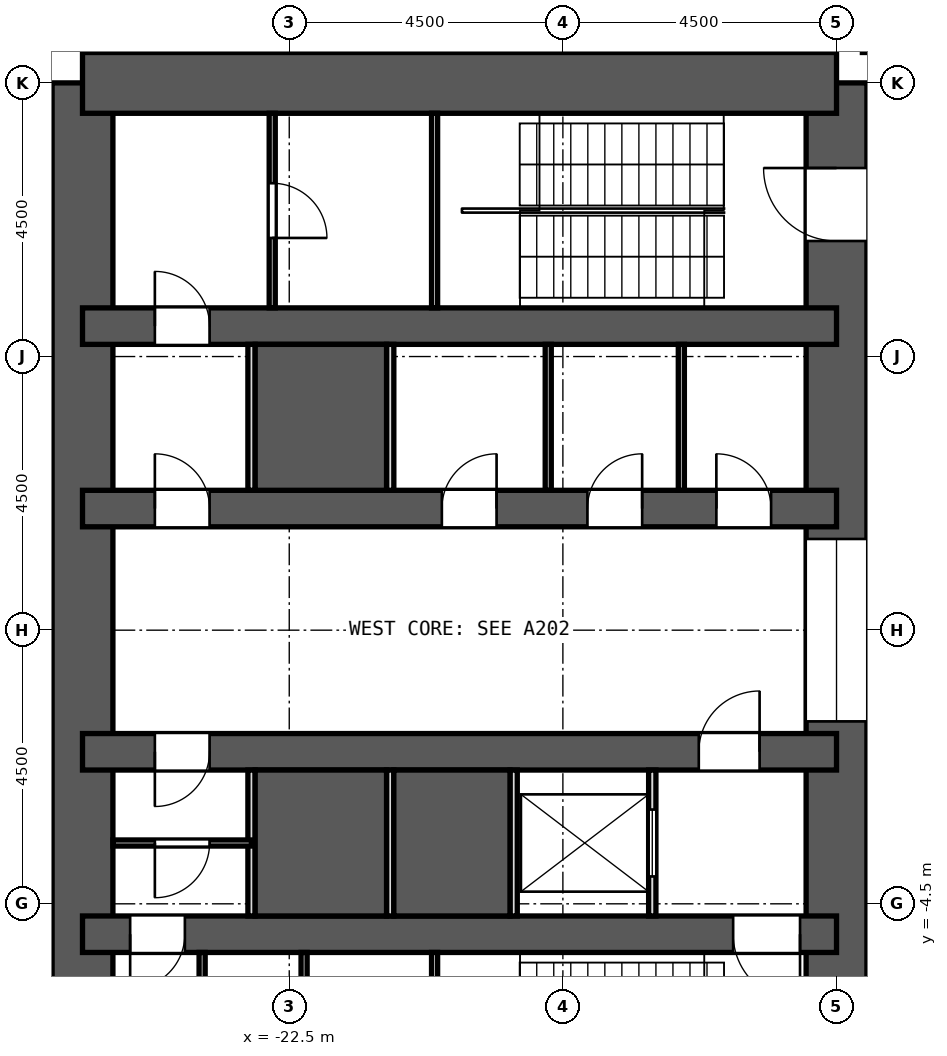
"""IFC4 building model, lengths in metres.
Left out: names, types, materials, properties, quantities, classifications, styles, units other than length and angle.
Written with IfcOpenShell. Run it as: python <this file> out.ifc"""

import sys

from ifc_helpers import new_model, si_unit, direction, frame, frame_2d, origin, place, context, subcontext, project, spatial, rectangle, extrude, element, fill, save


model = new_model("IFC4")
c1 = context("Model", 3, precision=1e-05, world=origin(), true_north=direction((0.0, 1.0)))
c2 = subcontext(c1, "Body", "Model", "MODEL_VIEW")
j1 = project(units=[si_unit("LENGTHUNIT", "METRE"), si_unit("PLANEANGLEUNIT", "RADIAN")], contexts=[c1])
p1 = place(None, origin())
s1 = spatial("IfcSite", under=j1, at=p1, CompositionType="ELEMENT")
p2 = place(p1, origin())
s2 = spatial("IfcBuilding", under=s1, at=p2, CompositionType="ELEMENT")
p3 = place(p2, frame((0.0, 0.0, -4.5)))
s3 = spatial("IfcBuildingStorey", under=s2, at=p3, CompositionType="ELEMENT", Elevation=-4.5)
p4 = place(p3, frame((-13.5, -9.0, 0.0), z_axis=(0.0, 0.0, 1.0), x_axis=(0.0, 1.0, 0.0)))
e1 = element("IfcWall", 1, at=p4, inside=s3, PredefinedType="SHEAR", context=c2, shape_type="SweptSolid", body=[
    extrude(rectangle(XDim=18.0, YDim=1.0, at=frame_2d((9.0, 0.0))), origin(), (0.0, 0.0, 1.0), 4.5),
])
p5 = place(p4, frame((15.4, 0.0, 0.0)))
e2 = element("IfcOpeningElement", 2, at=p5, cuts=e1, PredefinedType="OPENING", context=c2, shape_type="SweptSolid", body=[
    extrude(rectangle(XDim=1.2, YDim=2.1, at=frame_2d((0.6, 1.05))), frame((0.0, 0.512, 0.0), z_axis=(0.0, -1.0, 0.0), x_axis=(1.0, 0.0, 0.0)), (0.0, 0.0, 1.0), 1.024),
])
p6 = place(p4, frame((1.4, 0.0, 0.0)))
e3 = element("IfcOpeningElement", 3, at=p6, cuts=e1, PredefinedType="OPENING", context=c2, shape_type="SweptSolid", body=[
    extrude(rectangle(XDim=1.2, YDim=2.1, at=frame_2d((0.6, 1.05))), frame((0.0, 0.512, 0.0), z_axis=(0.0, -1.0, 0.0), x_axis=(1.0, 0.0, 0.0)), (0.0, 0.0, 1.0), 1.024),
])
p7 = place(p4, frame((7.5, 0.0, 0.0)))
e4 = element("IfcOpeningElement", 4, at=p7, cuts=e1, PredefinedType="OPENING", context=c2, shape_type="SweptSolid", body=[
    extrude(rectangle(XDim=3.0, YDim=2.4, at=frame_2d((1.5, 1.2))), frame((0.0, 0.512, 0.0), z_axis=(0.0, -1.0, 0.0), x_axis=(1.0, 0.0, 0.0)), (0.0, 0.0, 1.0), 1.024),
])
p8 = place(p3, frame((-25.9, -9.0, 0.0), z_axis=(0.0, 0.0, 1.0), x_axis=(0.0, 1.0, 0.0)))
e5 = element("IfcWall", 5, at=p8, inside=s3, PredefinedType="SHEAR", context=c2, shape_type="SweptSolid", body=[
    extrude(rectangle(XDim=18.0, YDim=1.0, at=frame_2d((9.0, 0.0))), origin(), (0.0, 0.0, 1.0), 4.5),
])
p9 = place(p3, frame((-13.5, 9.0, 0.0), z_axis=(0.0, 0.0, 1.0), x_axis=(-1.0, 0.0, 0.0)))
e6 = element("IfcWall", 6, at=p9, inside=s3, PredefinedType="SHEAR", context=c2, shape_type="SweptSolid", body=[
    extrude(rectangle(XDim=12.4, YDim=1.0, at=frame_2d((6.2, 0.0))), origin(), (0.0, 0.0, 1.0), 4.5),
])
p10 = place(p3, frame((-13.5, 5.0, 0.0), z_axis=(0.0, 0.0, 1.0), x_axis=(-1.0, 0.0, 0.0)))
e7 = element("IfcWall", 7, at=p10, inside=s3, PredefinedType="SHEAR", context=c2, shape_type="SweptSolid", body=[
    extrude(rectangle(XDim=12.4, YDim=0.6, at=frame_2d((6.2, 0.0))), origin(), (0.0, 0.0, 1.0), 4.5),
])
p11 = place(p10, frame((10.31, 0.0, 0.0)))
e8 = element("IfcOpeningElement", 8, at=p11, cuts=e7, PredefinedType="OPENING", context=c2, shape_type="SweptSolid", body=[
    extrude(rectangle(XDim=0.9, YDim=2.1, at=frame_2d((0.45, 1.05))), frame((0.0, 0.312, 0.0), z_axis=(0.0, -1.0, 0.0), x_axis=(1.0, 0.0, 0.0)), (0.0, 0.0, 1.0), 0.624),
])
p12 = place(p3, frame((-13.5, -5.0, 0.0), z_axis=(0.0, 0.0, 1.0), x_axis=(-1.0, 0.0, 0.0)))
e9 = element("IfcWall", 9, at=p12, inside=s3, PredefinedType="SHEAR", context=c2, shape_type="SweptSolid", body=[
    extrude(rectangle(XDim=12.4, YDim=0.6, at=frame_2d((6.2, 0.0))), origin(), (0.0, 0.0, 1.0), 4.5),
])
p13 = place(p12, frame((10.716, 0.0, 0.0)))
e10 = element("IfcOpeningElement", 10, at=p13, cuts=e9, PredefinedType="OPENING", context=c2, shape_type="SweptSolid", body=[
    extrude(rectangle(XDim=0.9, YDim=2.1, at=frame_2d((0.45, 1.05))), frame((0.0, 0.312, 0.0), z_axis=(0.0, -1.0, 0.0), x_axis=(1.0, 0.0, 0.0)), (0.0, 0.0, 1.0), 0.624),
])
p14 = place(p12, frame((0.6, 0.0, 0.0)))
e11 = element("IfcOpeningElement", 11, at=p14, cuts=e9, PredefinedType="OPENING", context=c2, shape_type="SweptSolid", body=[
    extrude(rectangle(XDim=1.1, YDim=2.1, at=frame_2d((0.55, 1.05))), frame((0.0, 0.312, 0.0), z_axis=(0.0, -1.0, 0.0), x_axis=(1.0, 0.0, 0.0)), (0.0, 0.0, 1.0), 0.624),
])
p15 = place(p3, frame((-13.5, 2.0, 0.0), z_axis=(0.0, 0.0, 1.0), x_axis=(-1.0, 0.0, 0.0)))
e12 = element("IfcWall", 12, at=p15, inside=s3, PredefinedType="SHEAR", context=c2, shape_type="SweptSolid", body=[
    extrude(rectangle(XDim=12.4, YDim=0.6, at=frame_2d((6.2, 0.0))), origin(), (0.0, 0.0, 1.0), 4.5),
])
p16 = place(p15, frame((1.076, 0.0, 0.0)))
e13 = element("IfcOpeningElement", 13, at=p16, cuts=e12, PredefinedType="OPENING", context=c2, shape_type="SweptSolid", body=[
    extrude(rectangle(XDim=0.9, YDim=2.1, at=frame_2d((0.45, 1.05))), frame((0.0, 0.312, 0.0), z_axis=(0.0, -1.0, 0.0), x_axis=(1.0, 0.0, 0.0)), (0.0, 0.0, 1.0), 0.624),
])
p17 = place(p15, frame((3.196, 0.0, 0.0)))
e14 = element("IfcOpeningElement", 14, at=p17, cuts=e12, PredefinedType="OPENING", context=c2, shape_type="SweptSolid", body=[
    extrude(rectangle(XDim=0.9, YDim=2.1, at=frame_2d((0.45, 1.05))), frame((0.0, 0.312, 0.0), z_axis=(0.0, -1.0, 0.0), x_axis=(1.0, 0.0, 0.0)), (0.0, 0.0, 1.0), 0.624),
])
p18 = place(p15, frame((5.59, 0.0, 0.0)))
e15 = element("IfcOpeningElement", 15, at=p18, cuts=e12, PredefinedType="OPENING", context=c2, shape_type="SweptSolid", body=[
    extrude(rectangle(XDim=0.9, YDim=2.1, at=frame_2d((0.45, 1.05))), frame((0.0, 0.312, 0.0), z_axis=(0.0, -1.0, 0.0), x_axis=(1.0, 0.0, 0.0)), (0.0, 0.0, 1.0), 0.624),
])
p19 = place(p15, frame((10.31, 0.0, 0.0)))
e16 = element("IfcOpeningElement", 16, at=p19, cuts=e12, PredefinedType="OPENING", context=c2, shape_type="SweptSolid", body=[
    extrude(rectangle(XDim=0.9, YDim=2.1, at=frame_2d((0.45, 1.05))), frame((0.0, 0.312, 0.0), z_axis=(0.0, -1.0, 0.0), x_axis=(1.0, 0.0, 0.0)), (0.0, 0.0, 1.0), 0.624),
])
p20 = place(p3, frame((-13.5, -2.0, 0.0), z_axis=(0.0, 0.0, 1.0), x_axis=(-1.0, 0.0, 0.0)))
e17 = element("IfcWall", 17, at=p20, inside=s3, PredefinedType="SHEAR", context=c2, shape_type="SweptSolid", body=[
    extrude(rectangle(XDim=12.4, YDim=0.6, at=frame_2d((6.2, 0.0))), origin(), (0.0, 0.0, 1.0), 4.5),
])
p21 = place(p20, frame((1.265, 0.0, 0.0)))
e18 = element("IfcOpeningElement", 18, at=p21, cuts=e17, PredefinedType="OPENING", context=c2, shape_type="SweptSolid", body=[
    extrude(rectangle(XDim=1.0, YDim=2.1, at=frame_2d((0.5, 1.05))), frame((0.0, 0.312, 0.0), z_axis=(0.0, -1.0, 0.0), x_axis=(1.0, 0.0, 0.0)), (0.0, 0.0, 1.0), 0.624),
])
p22 = place(p20, frame((10.31, 0.0, 0.0)))
e19 = element("IfcOpeningElement", 19, at=p22, cuts=e17, PredefinedType="OPENING", context=c2, shape_type="SweptSolid", body=[
    extrude(rectangle(XDim=0.9, YDim=2.1, at=frame_2d((0.45, 1.05))), frame((0.0, 0.312, 0.0), z_axis=(0.0, -1.0, 0.0), x_axis=(1.0, 0.0, 0.0)), (0.0, 0.0, 1.0), 0.624),
])
p23 = place(p3, frame((-12.965, 12.965, 0.0), z_axis=(0.0, 0.0, 1.0), x_axis=(0.707106781187, -0.707106781187, 0.0)))
e20 = element("IfcWall", 20, at=p23, inside=s3, PredefinedType="PARTITIONING", context=c2, shape_type="SweptSolid", body=[
    extrude(rectangle(XDim=5.498, YDim=0.15, at=frame_2d((2.749, 0.0))), origin(), (0.0, 0.0, 1.0), 3.95),
])
p24 = place(p23, frame((2.272, 0.0, 0.0)))
e21 = element("IfcOpeningElement", 21, at=p24, cuts=e20, PredefinedType="OPENING", context=c2, shape_type="SweptSolid", body=[
    extrude(rectangle(XDim=0.9, YDim=2.1, at=frame_2d((0.45, 1.05))), frame((0.0, 0.087, 0.0), z_axis=(0.0, -1.0, 0.0), x_axis=(1.0, 0.0, 0.0)), (0.0, 0.0, 1.0), 0.174),
])
p25 = place(p3, frame((-13.0, 9.5, 0.0), z_axis=(0.0, 0.0, 1.0), x_axis=(0.0, 1.0, 0.0)))
e22 = element("IfcWall", 22, at=p25, inside=s3, PredefinedType="PARTITIONING", context=c2, shape_type="SweptSolid", body=[
    extrude(rectangle(XDim=3.425, YDim=0.15, at=frame_2d((1.712, 0.0))), origin(), (0.0, 0.0, 1.0), 3.95),
])
p26 = place(p25, frame((1.15, 0.0, 0.0)))
e23 = element("IfcOpeningElement", 23, at=p26, cuts=e22, PredefinedType="OPENING", context=c2, shape_type="SweptSolid", body=[
    extrude(rectangle(XDim=1.2, YDim=2.1, at=frame_2d((0.6, 1.05))), frame((0.0, 0.087, 0.0), z_axis=(0.0, -1.0, 0.0), x_axis=(1.0, 0.0, 0.0)), (0.0, 0.0, 1.0), 0.174),
])
for number, where, z_axis, x_axis in (
    (24, (-16.052, 2.3, 0.0), (0.0, 0.0, 1.0), (0.0, 1.0, 0.0)),
    (25, (-18.241, 2.3, 0.0), (0.0, 0.0, 1.0), (0.0, 1.0, 0.0)),
):
    element("IfcWall", number, at=place(p3, frame(where, z_axis=z_axis, x_axis=x_axis)), inside=s3, PredefinedType="PARTITIONING", context=c2, shape_type="SweptSolid", body=[
        extrude(rectangle(XDim=2.4, YDim=0.1, at=frame_2d((1.2, 0.0))), origin(), (0.0, 0.0, 1.0), 3.95),
    ])
for number, where, z_axis, x_axis in (
    (26, (-20.84, 2.3, 0.0), (0.0, 0.0, 1.0), (0.0, 1.0, 0.0)),
    (27, (-23.12, 2.3, 0.0), (0.0, 0.0, 1.0), (0.0, 1.0, 0.0)),
):
    element("IfcWall", number, at=place(p3, frame(where, z_axis=z_axis, x_axis=x_axis)), inside=s3, PredefinedType="PARTITIONING", context=c2, shape_type="SweptSolid", body=[
        extrude(rectangle(XDim=2.4, YDim=0.12, at=frame_2d((1.2, 0.0))), origin(), (0.0, 0.0, 1.0), 3.95),
    ])
p27 = place(p3, frame((-16.53, -4.7, 0.0), z_axis=(0.0, 0.0, 1.0), x_axis=(0.0, 1.0, 0.0)))
e28 = element("IfcWall", 28, at=p27, inside=s3, PredefinedType="PARTITIONING", context=c2, shape_type="SweptSolid", body=[
    extrude(rectangle(XDim=2.4, YDim=0.12, at=frame_2d((1.2, 0.0))), origin(), (0.0, 0.0, 1.0), 3.95),
])
p28 = place(p27, frame((0.65, 0.0, 0.0)))
e29 = element("IfcOpeningElement", 29, at=p28, cuts=e28, PredefinedType="OPENING", context=c2, shape_type="SweptSolid", body=[
    extrude(rectangle(XDim=1.1, YDim=2.1, at=frame_2d((0.55, 1.05))), frame((0.0, 0.072, 0.0), z_axis=(0.0, -1.0, 0.0), x_axis=(1.0, 0.0, 0.0)), (0.0, 0.0, 1.0), 0.144),
])
for number, where, z_axis, x_axis in (
    (30, (-18.81, -4.7, 0.0), (0.0, 0.0, 1.0), (0.0, 1.0, 0.0)),
    (31, (-20.84, -4.7, 0.0), (0.0, 0.0, 1.0), (0.0, 1.0, 0.0)),
    (32, (-23.12, -4.7, 0.0), (0.0, 0.0, 1.0), (0.0, 1.0, 0.0)),
):
    element("IfcWall", number, at=place(p3, frame(where, z_axis=z_axis, x_axis=x_axis)), inside=s3, PredefinedType="PARTITIONING", context=c2, shape_type="SweptSolid", body=[
        extrude(rectangle(XDim=2.4, YDim=0.12, at=frame_2d((1.2, 0.0))), origin(), (0.0, 0.0, 1.0), 3.95),
    ])
p29 = place(p3, frame((-23.12, -3.5, 0.0), z_axis=(0.0, 0.0, 1.0), x_axis=(-1.0, 0.0, 0.0)))
e33 = element("IfcWall", 33, at=p29, inside=s3, PredefinedType="PARTITIONING", context=c2, shape_type="SweptSolid", body=[
    extrude(rectangle(XDim=2.28, YDim=0.1, at=frame_2d((1.14, 0.0))), origin(), (0.0, 0.0, 1.0), 3.95),
])
p30 = place(p29, frame((0.69, 0.0, 0.0)))
e34 = element("IfcOpeningElement", 34, at=p30, cuts=e33, PredefinedType="OPENING", context=c2, shape_type="SweptSolid", body=[
    extrude(rectangle(XDim=0.9, YDim=2.1, at=frame_2d((0.45, 1.05))), frame((0.0, 0.062, 0.0), z_axis=(0.0, -1.0, 0.0), x_axis=(1.0, 0.0, 0.0)), (0.0, 0.0, 1.0), 0.124),
])
p31 = place(p3, frame((-20.11, 5.3, 0.0), z_axis=(0.0, 0.0, 1.0), x_axis=(0.0, 1.0, 0.0)))
e35 = element("IfcWall", 35, at=p31, inside=s3, PredefinedType="PARTITIONING", context=c2, shape_type="SweptSolid", body=[
    extrude(rectangle(XDim=3.2, YDim=0.1, at=frame_2d((1.6, 0.0))), origin(), (0.0, 0.0, 1.0), 3.95),
])
p32 = place(p3, frame((-22.78, 5.3, 0.0), z_axis=(0.0, 0.0, 1.0), x_axis=(0.0, 1.0, 0.0)))
e36 = element("IfcWall", 36, at=p32, inside=s3, PredefinedType="PARTITIONING", context=c2, shape_type="SweptSolid", body=[
    extrude(rectangle(XDim=3.2, YDim=0.1, at=frame_2d((1.6, 0.0))), origin(), (0.0, 0.0, 1.0), 3.95),
])
p33 = place(p32, frame((1.15, 0.0, 0.0)))
e37 = element("IfcOpeningElement", 37, at=p33, cuts=e36, PredefinedType="OPENING", context=c2, shape_type="SweptSolid", body=[
    extrude(rectangle(XDim=0.9, YDim=2.1, at=frame_2d((0.45, 1.05))), frame((0.0, 0.062, 0.0), z_axis=(0.0, -1.0, 0.0), x_axis=(1.0, 0.0, 0.0)), (0.0, 0.0, 1.0), 0.124),
])
p34 = place(p3, frame((-20.11, -8.5, 0.0), z_axis=(0.0, 0.0, 1.0), x_axis=(0.0, 1.0, 0.0)))
e38 = element("IfcWall", 38, at=p34, inside=s3, PredefinedType="PARTITIONING", context=c2, shape_type="SweptSolid", body=[
    extrude(rectangle(XDim=3.2, YDim=0.1, at=frame_2d((1.6, 0.0))), origin(), (0.0, 0.0, 1.0), 3.95),
])
p35 = place(p3, frame((-22.256, -8.5, 0.0), z_axis=(0.0, 0.0, 1.0), x_axis=(0.0, 1.0, 0.0)))
e39 = element("IfcWall", 39, at=p35, inside=s3, PredefinedType="PARTITIONING", context=c2, shape_type="SweptSolid", body=[
    extrude(rectangle(XDim=3.2, YDim=0.1, at=frame_2d((1.6, 0.0))), origin(), (0.0, 0.0, 1.0), 3.95),
])
p36 = place(p35, frame((1.15, 0.0, 0.0)))
e40 = element("IfcOpeningElement", 40, at=p36, cuts=e39, PredefinedType="OPENING", context=c2, shape_type="SweptSolid", body=[
    extrude(rectangle(XDim=0.9, YDim=2.1, at=frame_2d((0.45, 1.05))), frame((0.0, 0.062, 0.0), z_axis=(0.0, -1.0, 0.0), x_axis=(1.0, 0.0, 0.0)), (0.0, 0.0, 1.0), 0.124),
])
p37 = place(p3, frame((-23.933, -8.5, 0.0), z_axis=(0.0, 0.0, 1.0), x_axis=(0.0, 1.0, 0.0)))
e41 = element("IfcWall", 41, at=p37, inside=s3, PredefinedType="PARTITIONING", context=c2, shape_type="SweptSolid", body=[
    extrude(rectangle(XDim=3.2, YDim=0.1, at=frame_2d((1.6, 0.0))), origin(), (0.0, 0.0, 1.0), 3.95),
])
p38 = place(p37, frame((1.15, 0.0, 0.0)))
e42 = element("IfcOpeningElement", 42, at=p38, cuts=e41, PredefinedType="OPENING", context=c2, shape_type="SweptSolid", body=[
    extrude(rectangle(XDim=0.9, YDim=2.1, at=frame_2d((0.45, 1.05))), frame((0.0, 0.062, 0.0), z_axis=(0.0, -1.0, 0.0), x_axis=(1.0, 0.0, 0.0)), (0.0, 0.0, 1.0), 0.124),
])
p39 = place(p3, frame((-20.9, 3.5, 0.0), z_axis=(0.0, 0.0, 1.0), x_axis=(-1.0, 0.0, 0.0)))
e43 = element("IfcWall", 43, at=p39, inside=s3, PredefinedType="SOLIDWALL", context=c2, shape_type="SweptSolid", body=[
    extrude(rectangle(XDim=2.16, YDim=2.4, at=frame_2d((1.08, 0.0))), origin(), (0.0, 0.0, 1.0), 3.1),
])
p40 = place(p3, frame((-18.87, -3.5, 0.0), z_axis=(0.0, 0.0, 1.0), x_axis=(-1.0, 0.0, 0.0)))
e44 = element("IfcWall", 44, at=p40, inside=s3, PredefinedType="SOLIDWALL", context=c2, shape_type="SweptSolid", body=[
    extrude(rectangle(XDim=1.91, YDim=2.4, at=frame_2d((0.955, 0.0))), origin(), (0.0, 0.0, 1.0), 3.1),
])
p41 = place(p3, frame((-20.9, -3.5, 0.0), z_axis=(0.0, 0.0, 1.0), x_axis=(-1.0, 0.0, 0.0)))
e45 = element("IfcWall", 45, at=p41, inside=s3, PredefinedType="SOLIDWALL", context=c2, shape_type="SweptSolid", body=[
    extrude(rectangle(XDim=2.16, YDim=2.4, at=frame_2d((1.08, 0.0))), origin(), (0.0, 0.0, 1.0), 3.1),
])
p42 = place(p28, origin())
e46 = element("IfcDoor", 46, at=p42, inside=s3, OperationType="DOUBLE_DOOR_SLIDING", PredefinedType="DOOR", context=c2, shape_type="SweptSolid", body=[
    extrude(rectangle(XDim=1.1, YDim=2.1, at=frame_2d((0.55, 1.05))), frame((0.0, 0.025, 0.0), z_axis=(0.0, -1.0, 0.0), x_axis=(1.0, 0.0, 0.0)), (0.0, 0.0, 1.0), 0.05),
])
fill(e29, e46)
p43 = place(p16, frame((0.9, 0.0, 0.0), z_axis=(0.0, 0.0, 1.0), x_axis=(-1.0, 0.0, 0.0)))
e47 = element("IfcDoor", 47, at=p43, inside=s3, OperationType="SINGLE_SWING_LEFT", PredefinedType="DOOR", context=c2, shape_type="SweptSolid", body=[
    extrude(rectangle(XDim=0.9, YDim=2.1, at=frame_2d((0.45, 1.05))), frame((0.0, 0.025, 0.0), z_axis=(0.0, -1.0, 0.0), x_axis=(1.0, 0.0, 0.0)), (0.0, 0.0, 1.0), 0.05),
])
fill(e13, e47)
p44 = place(p17, frame((0.9, 0.0, 0.0), z_axis=(0.0, 0.0, 1.0), x_axis=(-1.0, 0.0, 0.0)))
e48 = element("IfcDoor", 48, at=p44, inside=s3, OperationType="SINGLE_SWING_RIGHT", PredefinedType="DOOR", context=c2, shape_type="SweptSolid", body=[
    extrude(rectangle(XDim=0.9, YDim=2.1, at=frame_2d((0.45, 1.05))), frame((0.0, 0.025, 0.0), z_axis=(0.0, -1.0, 0.0), x_axis=(1.0, 0.0, 0.0)), (0.0, 0.0, 1.0), 0.05),
])
fill(e14, e48)
p45 = place(p18, frame((0.9, 0.0, 0.0), z_axis=(0.0, 0.0, 1.0), x_axis=(-1.0, 0.0, 0.0)))
e49 = element("IfcDoor", 49, at=p45, inside=s3, OperationType="SINGLE_SWING_RIGHT", PredefinedType="DOOR", context=c2, shape_type="SweptSolid", body=[
    extrude(rectangle(XDim=0.9, YDim=2.1, at=frame_2d((0.45, 1.05))), frame((0.0, 0.025, 0.0), z_axis=(0.0, -1.0, 0.0), x_axis=(1.0, 0.0, 0.0)), (0.0, 0.0, 1.0), 0.05),
])
fill(e15, e49)
p46 = place(p19, frame((0.9, 0.0, 0.0), z_axis=(0.0, 0.0, 1.0), x_axis=(-1.0, 0.0, 0.0)))
e50 = element("IfcDoor", 50, at=p46, inside=s3, OperationType="SINGLE_SWING_LEFT", PredefinedType="DOOR", context=c2, shape_type="SweptSolid", body=[
    extrude(rectangle(XDim=0.9, YDim=2.1, at=frame_2d((0.45, 1.05))), frame((0.0, 0.025, 0.0), z_axis=(0.0, -1.0, 0.0), x_axis=(1.0, 0.0, 0.0)), (0.0, 0.0, 1.0), 0.05),
])
fill(e16, e50)
p47 = place(p21, frame((1.0, 0.0, 0.0), z_axis=(0.0, 0.0, 1.0), x_axis=(-1.0, 0.0, 0.0)))
e51 = element("IfcDoor", 51, at=p47, inside=s3, OperationType="SINGLE_SWING_RIGHT", PredefinedType="DOOR", context=c2, shape_type="SweptSolid", body=[
    extrude(rectangle(XDim=1.0, YDim=2.1, at=frame_2d((0.5, 1.05))), frame((0.0, 0.025, 0.0), z_axis=(0.0, -1.0, 0.0), x_axis=(1.0, 0.0, 0.0)), (0.0, 0.0, 1.0), 0.05),
])
fill(e18, e51)
p48 = place(p22, origin())
e52 = element("IfcDoor", 52, at=p48, inside=s3, OperationType="SINGLE_SWING_RIGHT", PredefinedType="DOOR", context=c2, shape_type="SweptSolid", body=[
    extrude(rectangle(XDim=0.9, YDim=2.1, at=frame_2d((0.45, 1.05))), frame((0.0, 0.025, 0.0), z_axis=(0.0, -1.0, 0.0), x_axis=(1.0, 0.0, 0.0)), (0.0, 0.0, 1.0), 0.05),
])
fill(e19, e52)
p49 = place(p33, frame((0.9, 0.0, 0.0), z_axis=(0.0, 0.0, 1.0), x_axis=(-1.0, 0.0, 0.0)))
e53 = element("IfcDoor", 53, at=p49, inside=s3, OperationType="SINGLE_SWING_RIGHT", PredefinedType="DOOR", context=c2, shape_type="SweptSolid", body=[
    extrude(rectangle(XDim=0.9, YDim=2.1, at=frame_2d((0.45, 1.05))), frame((0.0, 0.025, 0.0), z_axis=(0.0, -1.0, 0.0), x_axis=(1.0, 0.0, 0.0)), (0.0, 0.0, 1.0), 0.05),
])
fill(e37, e53)
p50 = place(p11, frame((0.9, 0.0, 0.0), z_axis=(0.0, 0.0, 1.0), x_axis=(-1.0, 0.0, 0.0)))
e54 = element("IfcDoor", 54, at=p50, inside=s3, OperationType="SINGLE_SWING_LEFT", PredefinedType="DOOR", context=c2, shape_type="SweptSolid", body=[
    extrude(rectangle(XDim=0.9, YDim=2.1, at=frame_2d((0.45, 1.05))), frame((0.0, 0.025, 0.0), z_axis=(0.0, -1.0, 0.0), x_axis=(1.0, 0.0, 0.0)), (0.0, 0.0, 1.0), 0.05),
])
fill(e8, e54)
p51 = place(p30, origin())
e55 = element("IfcDoor", 55, at=p51, inside=s3, OperationType="SINGLE_SWING_RIGHT", PredefinedType="DOOR", context=c2, shape_type="SweptSolid", body=[
    extrude(rectangle(XDim=0.9, YDim=2.1, at=frame_2d((0.45, 1.05))), frame((0.0, 0.025, 0.0), z_axis=(0.0, -1.0, 0.0), x_axis=(1.0, 0.0, 0.0)), (0.0, 0.0, 1.0), 0.05),
])
fill(e34, e55)
p52 = place(p13, origin())
e56 = element("IfcDoor", 56, at=p52, inside=s3, OperationType="SINGLE_SWING_RIGHT", PredefinedType="DOOR", context=c2, shape_type="SweptSolid", body=[
    extrude(rectangle(XDim=0.9, YDim=2.1, at=frame_2d((0.45, 1.05))), frame((0.0, 0.025, 0.0), z_axis=(0.0, -1.0, 0.0), x_axis=(1.0, 0.0, 0.0)), (0.0, 0.0, 1.0), 0.05),
])
fill(e10, e56)
p53 = place(p14, origin())
e57 = element("IfcDoor", 57, at=p53, inside=s3, OperationType="SINGLE_SWING_LEFT", PredefinedType="DOOR", context=c2, shape_type="SweptSolid", body=[
    extrude(rectangle(XDim=1.1, YDim=2.1, at=frame_2d((0.55, 1.05))), frame((0.0, 0.025, 0.0), z_axis=(0.0, -1.0, 0.0), x_axis=(1.0, 0.0, 0.0)), (0.0, 0.0, 1.0), 0.05),
])
fill(e11, e57)
p54 = place(p5, origin())
e58 = element("IfcDoor", 58, at=p54, inside=s3, OperationType="SINGLE_SWING_RIGHT", PredefinedType="DOOR", context=c2, shape_type="SweptSolid", body=[
    extrude(rectangle(XDim=1.2, YDim=2.1, at=frame_2d((0.6, 1.05))), frame((0.0, 0.025, 0.0), z_axis=(0.0, -1.0, 0.0), x_axis=(1.0, 0.0, 0.0)), (0.0, 0.0, 1.0), 0.05),
])
fill(e2, e58)
p55 = place(p7, origin())
e59 = element("IfcDoor", 59, at=p55, inside=s3, OperationType="DOUBLE_DOOR_SLIDING", PredefinedType="DOOR", context=c2, shape_type="SweptSolid", body=[
    extrude(rectangle(XDim=3.0, YDim=2.4, at=frame_2d((1.5, 1.2))), frame((0.0, 0.025, 0.0), z_axis=(0.0, -1.0, 0.0), x_axis=(1.0, 0.0, 0.0)), (0.0, 0.0, 1.0), 0.05),
])
fill(e4, e59)
save(model, sys.argv[1])
